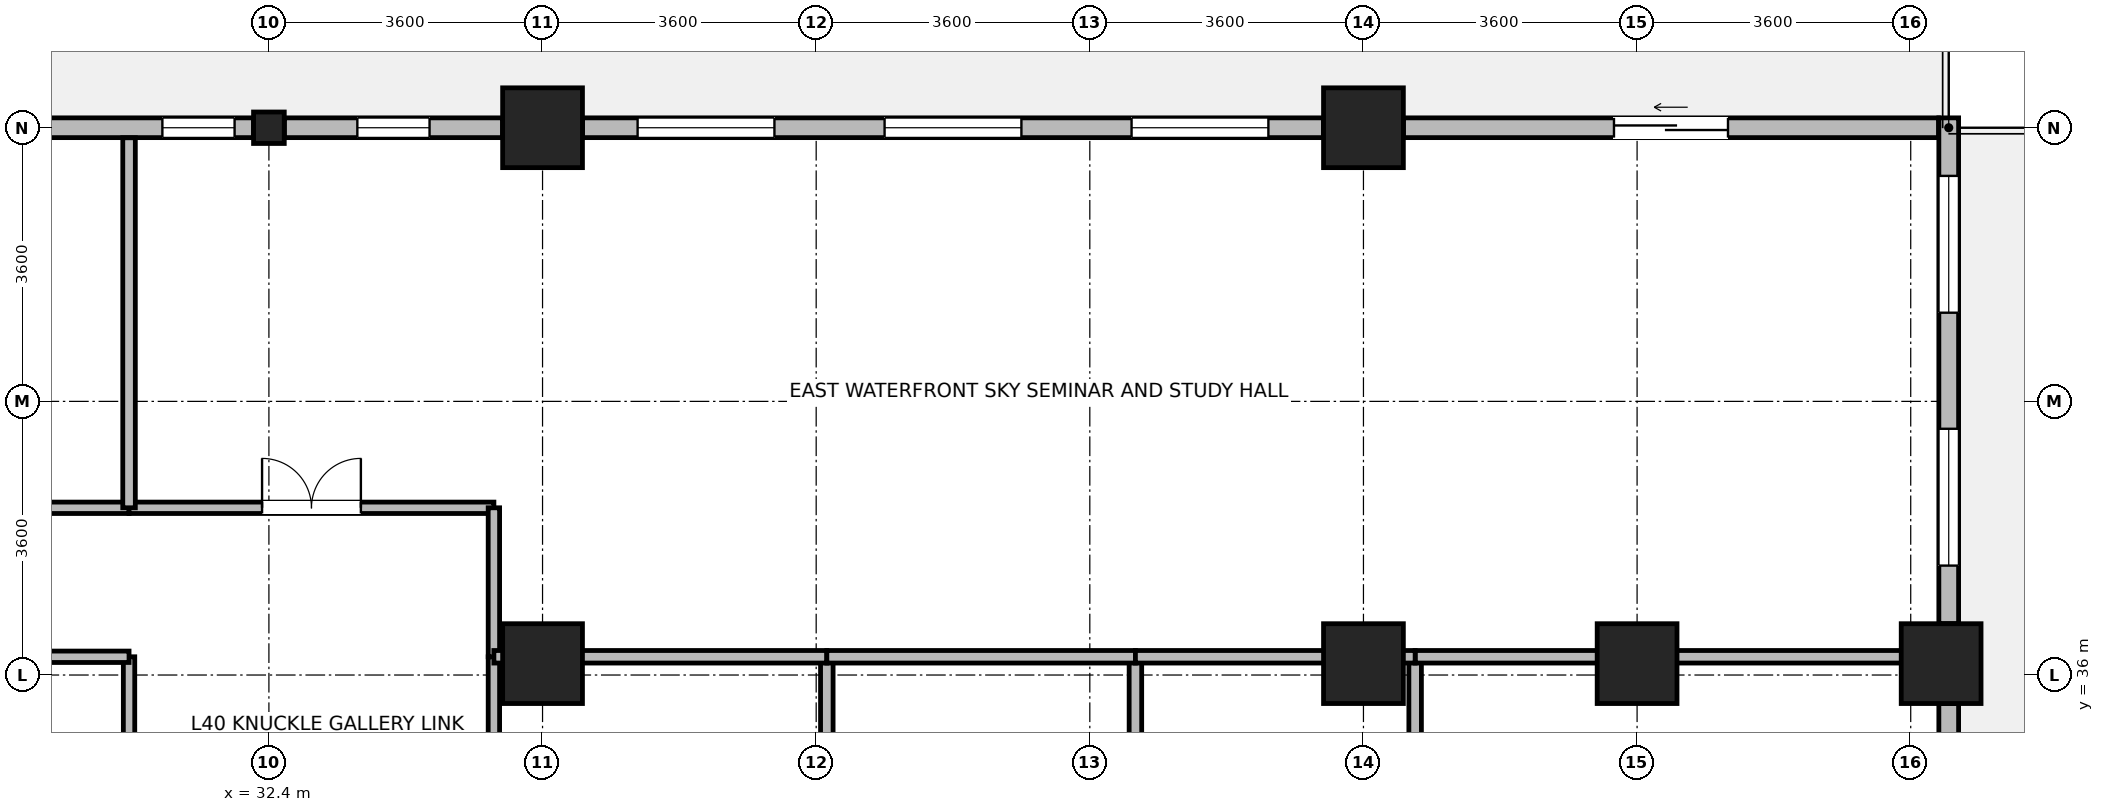
"""IFC4 building model, lengths in metres.
Left out: names, types, materials, properties, quantities, classifications, styles, units other than length and angle.
Written with IfcOpenShell. Run it as: python <this file> out.ifc"""

import sys

from ifc_helpers import new_model, si_unit, direction, frame, frame_2d, origin, origin_2d, place, context, subcontext, project, spatial, rectangle, i_section, extrude, source, transform, mapped, element, fill, save


model = new_model("IFC4")
c1 = context("Model", 3, precision=1e-05, world=origin(), true_north=direction((0.0, 1.0)))
c2 = subcontext(c1, "Body", "Model", "MODEL_VIEW")
j1 = project(units=[si_unit("LENGTHUNIT", "METRE"), si_unit("PLANEANGLEUNIT", "RADIAN")], contexts=[c1])
p1 = place(None, origin())
s1 = spatial("IfcSite", under=j1, at=p1, CompositionType="ELEMENT")
p2 = place(p1, origin())
s2 = spatial("IfcBuilding", under=s1, at=p2, CompositionType="ELEMENT")
p3 = place(p2, frame((0.0, 0.0, 158.7)))
s3 = spatial("IfcBuildingStorey", under=s2, at=p3, CompositionType="ELEMENT", Elevation=158.7)
m1 = source(origin(), c2, "Body", "SweptSolid", [
    extrude(rectangle(XDim=1.05, YDim=1.05, at=origin_2d()), origin(), (0.0, 0.0, 1.0), 3.7),
])
for number, where, z_axis, x_axis in (
    (1, (36.0, 43.2, 0.0), (0.0, 0.0, 1.0), (1.0, 0.0, 0.0)),
    (2, (36.0, 36.15, 0.0), (0.0, 0.0, 1.0), (1.0, 0.0, 0.0)),
    (3, (46.8, 36.15, 0.0), (0.0, 0.0, 1.0), (1.0, 0.0, 0.0)),
    (4, (46.8, 43.2, 0.0), (0.0, 0.0, 1.0), (1.0, 0.0, 0.0)),
    (5, (50.4, 36.15, 0.0), (0.0, 0.0, 1.0), (1.0, 0.0, 0.0)),
    (6, (54.4, 36.15, 0.0), (0.0, 0.0, 1.0), (1.0, 0.0, 0.0)),
):
    element("IfcColumn", number, at=place(p3, frame(where, z_axis=z_axis, x_axis=x_axis)), inside=s3, PredefinedType="COLUMN", context=c2, shape_type="MappedRepresentation", body=[
        mapped(m1, transform((0.0, 0.0, 0.0), x_axis=(1.0, 0.0, 0.0), y_axis=(0.0, 1.0, 0.0), z_axis=(0.0, 0.0, 1.0), scale=1.0)),
    ])
m2 = source(origin(), c2, "Body", "SweptSolid", [
    extrude(i_section(OverallWidth=0.404, OverallDepth=0.414, WebThickness=0.021, FlangeThickness=0.028, FilletRadius=0.015, at=origin_2d()), origin(), (0.0, 0.0, 1.0), 3.7),
])
p4 = place(p3, frame((32.4, 43.2, 0.0), z_axis=(0.0, 0.0, 1.0), x_axis=(1.0, 0.0, 0.0)))
e7 = element("IfcColumn", 7, at=p4, inside=s3, PredefinedType="COLUMN", context=c2, shape_type="MappedRepresentation", body=[
    mapped(m2, transform((0.0, 0.0, 0.0), x_axis=(1.0, 0.0, 0.0), y_axis=(0.0, 1.0, 0.0), z_axis=(0.0, 0.0, 1.0), scale=1.0)),
])
p5 = place(p3, frame((54.5, 35.624, 0.0), z_axis=(0.0, 0.0, 1.0), x_axis=(0.0, -1.0, 0.0)))
e8 = element("IfcWall", 8, at=p5, inside=s3, PredefinedType="STANDARD", context=c2, shape_type="SweptSolid", body=[
    extrude(rectangle(XDim=6.448, YDim=0.26, at=frame_2d((3.224, 0.0))), origin(), (0.0, 0.0, 1.0), 2.99),
])
p6 = place(p5, frame((0.712, 0.0, 0.85)))
e9 = element("IfcOpeningElement", 9, at=p6, cuts=e8, PredefinedType="OPENING", context=c2, shape_type="SweptSolid", body=[
    extrude(rectangle(XDim=1.8, YDim=1.85, at=frame_2d((0.9, 0.925))), frame((0.0, 0.14, 0.0), z_axis=(0.0, -1.0, 0.0), x_axis=(1.0, 0.0, 0.0)), (0.0, 0.0, 1.0), 0.28),
])
p7 = place(p5, frame((3.936, 0.0, 0.85)))
e10 = element("IfcOpeningElement", 10, at=p7, cuts=e8, PredefinedType="OPENING", context=c2, shape_type="SweptSolid", body=[
    extrude(rectangle(XDim=1.8, YDim=1.85, at=frame_2d((0.9, 0.925))), frame((0.0, 0.14, 0.0), z_axis=(0.0, -1.0, 0.0), x_axis=(1.0, 0.0, 0.0)), (0.0, 0.0, 1.0), 0.28),
])
p8 = place(p3, frame((54.5, 43.33, 0.0), z_axis=(0.0, 0.0, 1.0), x_axis=(0.0, -1.0, 0.0)))
e11 = element("IfcWall", 11, at=p8, inside=s3, PredefinedType="STANDARD", context=c2, shape_type="SweptSolid", body=[
    extrude(rectangle(XDim=6.654, YDim=0.26, at=frame_2d((3.327, 0.0))), origin(), (0.0, 0.0, 1.0), 3.44),
])
p9 = place(p8, frame((0.763, 0.0, 0.85)))
e12 = element("IfcOpeningElement", 12, at=p9, cuts=e11, PredefinedType="OPENING", context=c2, shape_type="SweptSolid", body=[
    extrude(rectangle(XDim=1.8, YDim=1.85, at=frame_2d((0.9, 0.925))), frame((0.0, 0.14, 0.0), z_axis=(0.0, -1.0, 0.0), x_axis=(1.0, 0.0, 0.0)), (0.0, 0.0, 1.0), 0.28),
])
p10 = place(p8, frame((4.091, 0.0, 0.85)))
e13 = element("IfcOpeningElement", 13, at=p10, cuts=e11, PredefinedType="OPENING", context=c2, shape_type="SweptSolid", body=[
    extrude(rectangle(XDim=1.8, YDim=1.85, at=frame_2d((0.9, 0.925))), frame((0.0, 0.14, 0.0), z_axis=(0.0, -1.0, 0.0), x_axis=(1.0, 0.0, 0.0)), (0.0, 0.0, 1.0), 0.28),
])
p11 = place(p3, frame((47.326, 43.2, 0.0), z_axis=(0.0, 0.0, 1.0), x_axis=(1.0, 0.0, 0.0)))
e14 = element("IfcWall", 14, at=p11, inside=s3, PredefinedType="STANDARD", context=c2, shape_type="SweptSolid", body=[
    extrude(rectangle(XDim=7.039, YDim=0.26, at=frame_2d((3.52, 0.0))), origin(), (0.0, 0.0, 1.0), 3.44),
])
p12 = place(p11, frame((2.77, 0.0, 0.0)))
e15 = element("IfcOpeningElement", 15, at=p12, cuts=e14, PredefinedType="OPENING", context=c2, shape_type="SweptSolid", body=[
    extrude(rectangle(XDim=1.5, YDim=2.15, at=frame_2d((0.75, 1.075))), frame((0.0, 0.14, 0.0), z_axis=(0.0, -1.0, 0.0), x_axis=(1.0, 0.0, 0.0)), (0.0, 0.0, 1.0), 0.28),
])
p13 = place(p3, frame((36.526, 43.2, 0.0), z_axis=(0.0, 0.0, 1.0), x_axis=(1.0, 0.0, 0.0)))
e16 = element("IfcWall", 16, at=p13, inside=s3, PredefinedType="STANDARD", context=c2, shape_type="SweptSolid", body=[
    extrude(rectangle(XDim=9.748, YDim=0.26, at=frame_2d((4.874, 0.0))), origin(), (0.0, 0.0, 1.0), 2.99),
])
p14 = place(p13, frame((0.725, 0.0, 0.85)))
e17 = element("IfcOpeningElement", 17, at=p14, cuts=e16, PredefinedType="OPENING", context=c2, shape_type="SweptSolid", body=[
    extrude(rectangle(XDim=1.8, YDim=1.85, at=frame_2d((0.9, 0.925))), frame((0.0, 0.14, 0.0), z_axis=(0.0, -1.0, 0.0), x_axis=(1.0, 0.0, 0.0)), (0.0, 0.0, 1.0), 0.28),
])
p15 = place(p13, frame((3.974, 0.0, 0.85)))
e18 = element("IfcOpeningElement", 18, at=p15, cuts=e16, PredefinedType="OPENING", context=c2, shape_type="SweptSolid", body=[
    extrude(rectangle(XDim=1.8, YDim=1.85, at=frame_2d((0.9, 0.925))), frame((0.0, 0.14, 0.0), z_axis=(0.0, -1.0, 0.0), x_axis=(1.0, 0.0, 0.0)), (0.0, 0.0, 1.0), 0.28),
])
p16 = place(p13, frame((7.223, 0.0, 0.85)))
e19 = element("IfcOpeningElement", 19, at=p16, cuts=e16, PredefinedType="OPENING", context=c2, shape_type="SweptSolid", body=[
    extrude(rectangle(XDim=1.8, YDim=1.85, at=frame_2d((0.9, 0.925))), frame((0.0, 0.14, 0.0), z_axis=(0.0, -1.0, 0.0), x_axis=(1.0, 0.0, 0.0)), (0.0, 0.0, 1.0), 0.28),
])
p17 = place(p3, frame((32.603, 43.2, 0.0), z_axis=(0.0, 0.0, 1.0), x_axis=(1.0, 0.0, 0.0)))
e20 = element("IfcWall", 20, at=p17, inside=s3, PredefinedType="STANDARD", context=c2, shape_type="SweptSolid", body=[
    extrude(rectangle(XDim=2.871, YDim=0.26, at=frame_2d((1.436, 0.0))), origin(), (0.0, 0.0, 1.0), 2.99),
])
p18 = place(p17, frame((0.96, 0.0, 0.85)))
e21 = element("IfcOpeningElement", 21, at=p18, cuts=e20, PredefinedType="OPENING", context=c2, shape_type="SweptSolid", body=[
    extrude(rectangle(XDim=0.95, YDim=1.75, at=frame_2d((0.475, 0.875))), frame((0.0, 0.14, 0.0), z_axis=(0.0, -1.0, 0.0), x_axis=(1.0, 0.0, 0.0)), (0.0, 0.0, 1.0), 0.28),
])
p19 = place(p3, frame((29.326, 43.2, 0.0), z_axis=(0.0, 0.0, 1.0), x_axis=(1.0, 0.0, 0.0)))
e22 = element("IfcWall", 22, at=p19, inside=s3, PredefinedType="STANDARD", context=c2, shape_type="SweptSolid", body=[
    extrude(rectangle(XDim=2.871, YDim=0.26, at=frame_2d((1.436, 0.0))), origin(), (0.0, 0.0, 1.0), 2.99),
])
p20 = place(p19, frame((1.673, 0.0, 0.85)))
e23 = element("IfcOpeningElement", 23, at=p20, cuts=e22, PredefinedType="OPENING", context=c2, shape_type="SweptSolid", body=[
    extrude(rectangle(XDim=0.95, YDim=1.75, at=frame_2d((0.475, 0.875))), frame((0.0, 0.14, 0.0), z_axis=(0.0, -1.0, 0.0), x_axis=(1.0, 0.0, 0.0)), (0.0, 0.0, 1.0), 0.28),
])
p21 = place(p3, frame((22.74, 38.2, 0.0), z_axis=(0.0, 0.0, 1.0), x_axis=(1.0, 0.0, 0.0)))
e24 = element("IfcWall", 24, at=p21, inside=s3, PredefinedType="PARTITIONING", context=c2, shape_type="SweptSolid", body=[
    extrude(rectangle(XDim=7.82, YDim=0.15, at=frame_2d((3.91, 0.0))), origin(), (0.0, 0.0, 1.0), 3.44),
])
p22 = place(p21, frame((3.46, 0.0, 0.0)))
e25 = element("IfcOpeningElement", 25, at=p22, cuts=e24, PredefinedType="OPENING", context=c2, shape_type="SweptSolid", body=[
    extrude(rectangle(XDim=0.9, YDim=2.08, at=frame_2d((0.45, 1.04))), frame((0.0, 0.085, 0.0), z_axis=(0.0, -1.0, 0.0), x_axis=(1.0, 0.0, 0.0)), (0.0, 0.0, 1.0), 0.17),
])
p23 = place(p3, frame((35.36, 28.56, 0.0), z_axis=(0.0, 0.0, 1.0), x_axis=(0.0, 1.0, 0.0)))
e26 = element("IfcWall", 26, at=p23, inside=s3, PredefinedType="PARTITIONING", context=c2, shape_type="SweptSolid", body=[
    extrude(rectangle(XDim=7.68, YDim=0.15, at=frame_2d((3.84, 0.0))), origin(), (0.0, 0.0, 1.0), 3.44),
])
p24 = place(p23, frame((3.19, 0.0, 0.0)))
e27 = element("IfcOpeningElement", 27, at=p24, cuts=e26, PredefinedType="OPENING", context=c2, shape_type="SweptSolid", body=[
    extrude(rectangle(XDim=1.3, YDim=2.12, at=frame_2d((0.65, 1.06))), frame((0.0, 0.085, 0.0), z_axis=(0.0, -1.0, 0.0), x_axis=(1.0, 0.0, 0.0)), (0.0, 0.0, 1.0), 0.17),
])
p25 = place(p3, frame((30.56, 38.2, 0.0), z_axis=(0.0, 0.0, 1.0), x_axis=(1.0, 0.0, 0.0)))
e28 = element("IfcWall", 28, at=p25, inside=s3, PredefinedType="PARTITIONING", context=c2, shape_type="SweptSolid", body=[
    extrude(rectangle(XDim=4.8, YDim=0.15, at=frame_2d((2.4, 0.0))), origin(), (0.0, 0.0, 1.0), 3.44),
])
p26 = place(p25, frame((1.75, 0.0, 0.0)))
e29 = element("IfcOpeningElement", 29, at=p26, cuts=e28, PredefinedType="OPENING", context=c2, shape_type="SweptSolid", body=[
    extrude(rectangle(XDim=1.3, YDim=2.12, at=frame_2d((0.65, 1.06))), frame((0.0, 0.085, 0.0), z_axis=(0.0, -1.0, 0.0), x_axis=(1.0, 0.0, 0.0)), (0.0, 0.0, 1.0), 0.17),
])
p27 = place(p3, frame((30.56, 31.64, 0.0), z_axis=(0.0, 0.0, 1.0), x_axis=(0.0, 1.0, 0.0)))
e30 = element("IfcWall", 30, at=p27, inside=s3, PredefinedType="PARTITIONING", context=c2, shape_type="SweptSolid", body=[
    extrude(rectangle(XDim=4.6, YDim=0.15, at=frame_2d((2.3, 0.0))), origin(), (0.0, 0.0, 1.0), 3.44),
])
p28 = place(p27, frame((1.65, 0.0, 0.0)))
e31 = element("IfcOpeningElement", 31, at=p28, cuts=e30, PredefinedType="OPENING", context=c2, shape_type="SweptSolid", body=[
    extrude(rectangle(XDim=1.3, YDim=2.12, at=frame_2d((0.65, 1.06))), frame((0.0, 0.085, 0.0), z_axis=(0.0, -1.0, 0.0), x_axis=(1.0, 0.0, 0.0)), (0.0, 0.0, 1.0), 0.17),
])
p29 = place(p3, frame((35.36, 36.24, 0.0), z_axis=(0.0, 0.0, 1.0), x_axis=(0.0, 1.0, 0.0)))
e32 = element("IfcWall", 32, at=p29, inside=s3, PredefinedType="PARTITIONING", context=c2, shape_type="SweptSolid", body=[
    extrude(rectangle(XDim=1.96, YDim=0.15, at=frame_2d((0.98, 0.0))), origin(), (0.0, 0.0, 1.0), 3.44),
])
p30 = place(p3, frame((29.325, 36.24, 0.0), z_axis=(0.0, 0.0, 1.0), x_axis=(1.0, 0.0, 0.0)))
e33 = element("IfcWall", 33, at=p30, inside=s3, PredefinedType="PARTITIONING", context=c2, shape_type="SweptSolid", body=[
    extrude(rectangle(XDim=1.235, YDim=0.15, at=frame_2d((0.618, 0.0))), origin(), (0.0, 0.0, 1.0), 2.84),
])
for number, where, z_axis, x_axis in (
    (34, (39.74, 28.56, 0.0), (0.0, 0.0, 1.0), (0.0, 1.0, 0.0)),
    (35, (43.8, 28.56, 0.0), (0.0, 0.0, 1.0), (0.0, 1.0, 0.0)),
    (36, (47.48, 28.56, 0.0), (0.0, 0.0, 1.0), (0.0, 1.0, 0.0)),
):
    element("IfcWall", number, at=place(p3, frame(where, z_axis=z_axis, x_axis=x_axis)), inside=s3, PredefinedType="PARTITIONING", context=c2, shape_type="SweptSolid", body=[
        extrude(rectangle(XDim=7.68, YDim=0.165, at=frame_2d((3.84, 0.0))), origin(), (0.0, 0.0, 1.0), 3.44),
    ])
p31 = place(p3, frame((47.48, 36.24, 0.0), z_axis=(0.0, 0.0, 1.0), x_axis=(1.0, 0.0, 0.0)))
e37 = element("IfcWall", 37, at=p31, inside=s3, PredefinedType="PARTITIONING", context=c2, shape_type="SweptSolid", body=[
    extrude(rectangle(XDim=6.888, YDim=0.165, at=frame_2d((3.444, 0.0))), origin(), (0.0, 0.0, 1.0), 2.84),
])
p32 = place(p3, frame((30.56, 38.2, 0.0), z_axis=(0.0, 0.0, 1.0), x_axis=(0.0, 1.0, 0.0)))
e38 = element("IfcWall", 38, at=p32, inside=s3, PredefinedType="PARTITIONING", context=c2, shape_type="SweptSolid", body=[
    extrude(rectangle(XDim=4.868, YDim=0.165, at=frame_2d((2.434, 0.0))), origin(), (0.0, 0.0, 1.0), 3.44),
])
p33 = place(p3, frame((35.36, 36.24, 0.0), z_axis=(0.0, 0.0, 1.0), x_axis=(1.0, 0.0, 0.0)))
e39 = element("IfcWall", 39, at=p33, inside=s3, PredefinedType="PARTITIONING", context=c2, shape_type="SweptSolid", body=[
    extrude(rectangle(XDim=4.38, YDim=0.165, at=frame_2d((2.19, 0.0))), origin(), (0.0, 0.0, 1.0), 2.84),
])
p34 = place(p3, frame((39.74, 36.24, 0.0), z_axis=(0.0, 0.0, 1.0), x_axis=(1.0, 0.0, 0.0)))
e40 = element("IfcWall", 40, at=p34, inside=s3, PredefinedType="PARTITIONING", context=c2, shape_type="SweptSolid", body=[
    extrude(rectangle(XDim=4.06, YDim=0.165, at=frame_2d((2.03, 0.0))), origin(), (0.0, 0.0, 1.0), 2.84),
])
p35 = place(p3, frame((43.8, 36.24, 0.0), z_axis=(0.0, 0.0, 1.0), x_axis=(1.0, 0.0, 0.0)))
e41 = element("IfcWall", 41, at=p35, inside=s3, PredefinedType="PARTITIONING", context=c2, shape_type="SweptSolid", body=[
    extrude(rectangle(XDim=3.68, YDim=0.165, at=frame_2d((1.84, 0.0))), origin(), (0.0, 0.0, 1.0), 2.84),
])
p36 = place(p9, origin())
e42 = element("IfcWindow", 42, at=p36, inside=s3, PartitioningType="SINGLE_PANEL", PredefinedType="WINDOW", context=c2, shape_type="SweptSolid", body=[
    extrude(rectangle(XDim=1.8, YDim=1.85, at=frame_2d((0.9, 0.925))), frame((0.0, 0.03, 0.0), z_axis=(0.0, -1.0, 0.0), x_axis=(1.0, 0.0, 0.0)), (0.0, 0.0, 1.0), 0.06),
])
fill(e12, e42)
p37 = place(p10, origin())
e43 = element("IfcWindow", 43, at=p37, inside=s3, PartitioningType="SINGLE_PANEL", PredefinedType="WINDOW", context=c2, shape_type="SweptSolid", body=[
    extrude(rectangle(XDim=1.8, YDim=1.85, at=frame_2d((0.9, 0.925))), frame((0.0, 0.03, 0.0), z_axis=(0.0, -1.0, 0.0), x_axis=(1.0, 0.0, 0.0)), (0.0, 0.0, 1.0), 0.06),
])
fill(e13, e43)
p38 = place(p12, origin())
e44 = element("IfcDoor", 44, at=p38, inside=s3, OperationType="SLIDING_TO_LEFT", PredefinedType="DOOR", context=c2, shape_type="SweptSolid", body=[
    extrude(rectangle(XDim=1.5, YDim=2.15, at=frame_2d((0.75, 1.075))), frame((0.0, 0.025, 0.0), z_axis=(0.0, -1.0, 0.0), x_axis=(1.0, 0.0, 0.0)), (0.0, 0.0, 1.0), 0.05),
])
fill(e15, e44)
p39 = place(p14, origin())
e45 = element("IfcWindow", 45, at=p39, inside=s3, PartitioningType="SINGLE_PANEL", PredefinedType="WINDOW", context=c2, shape_type="SweptSolid", body=[
    extrude(rectangle(XDim=1.8, YDim=1.85, at=frame_2d((0.9, 0.925))), frame((0.0, 0.03, 0.0), z_axis=(0.0, -1.0, 0.0), x_axis=(1.0, 0.0, 0.0)), (0.0, 0.0, 1.0), 0.06),
])
fill(e17, e45)
p40 = place(p15, origin())
e46 = element("IfcWindow", 46, at=p40, inside=s3, PartitioningType="SINGLE_PANEL", PredefinedType="WINDOW", context=c2, shape_type="SweptSolid", body=[
    extrude(rectangle(XDim=1.8, YDim=1.85, at=frame_2d((0.9, 0.925))), frame((0.0, 0.03, 0.0), z_axis=(0.0, -1.0, 0.0), x_axis=(1.0, 0.0, 0.0)), (0.0, 0.0, 1.0), 0.06),
])
fill(e18, e46)
p41 = place(p16, origin())
e47 = element("IfcWindow", 47, at=p41, inside=s3, PartitioningType="SINGLE_PANEL", PredefinedType="WINDOW", context=c2, shape_type="SweptSolid", body=[
    extrude(rectangle(XDim=1.8, YDim=1.85, at=frame_2d((0.9, 0.925))), frame((0.0, 0.03, 0.0), z_axis=(0.0, -1.0, 0.0), x_axis=(1.0, 0.0, 0.0)), (0.0, 0.0, 1.0), 0.06),
])
fill(e19, e47)
p42 = place(p18, origin())
e48 = element("IfcWindow", 48, at=p42, inside=s3, PartitioningType="SINGLE_PANEL", PredefinedType="WINDOW", context=c2, shape_type="SweptSolid", body=[
    extrude(rectangle(XDim=0.95, YDim=1.75, at=frame_2d((0.475, 0.875))), frame((0.0, 0.03, 0.0), z_axis=(0.0, -1.0, 0.0), x_axis=(1.0, 0.0, 0.0)), (0.0, 0.0, 1.0), 0.06),
])
fill(e21, e48)
p43 = place(p20, origin())
e49 = element("IfcWindow", 49, at=p43, inside=s3, PartitioningType="SINGLE_PANEL", PredefinedType="WINDOW", context=c2, shape_type="SweptSolid", body=[
    extrude(rectangle(XDim=0.95, YDim=1.75, at=frame_2d((0.475, 0.875))), frame((0.0, 0.03, 0.0), z_axis=(0.0, -1.0, 0.0), x_axis=(1.0, 0.0, 0.0)), (0.0, 0.0, 1.0), 0.06),
])
fill(e23, e49)
p44 = place(p26, origin())
e50 = element("IfcDoor", 50, at=p44, inside=s3, OperationType="DOUBLE_DOOR_SINGLE_SWING", PredefinedType="DOOR", context=c2, shape_type="SweptSolid", body=[
    extrude(rectangle(XDim=1.3, YDim=2.12, at=frame_2d((0.65, 1.06))), frame((0.0, 0.025, 0.0), z_axis=(0.0, -1.0, 0.0), x_axis=(1.0, 0.0, 0.0)), (0.0, 0.0, 1.0), 0.05),
])
fill(e29, e50)
save(model, sys.argv[1])
